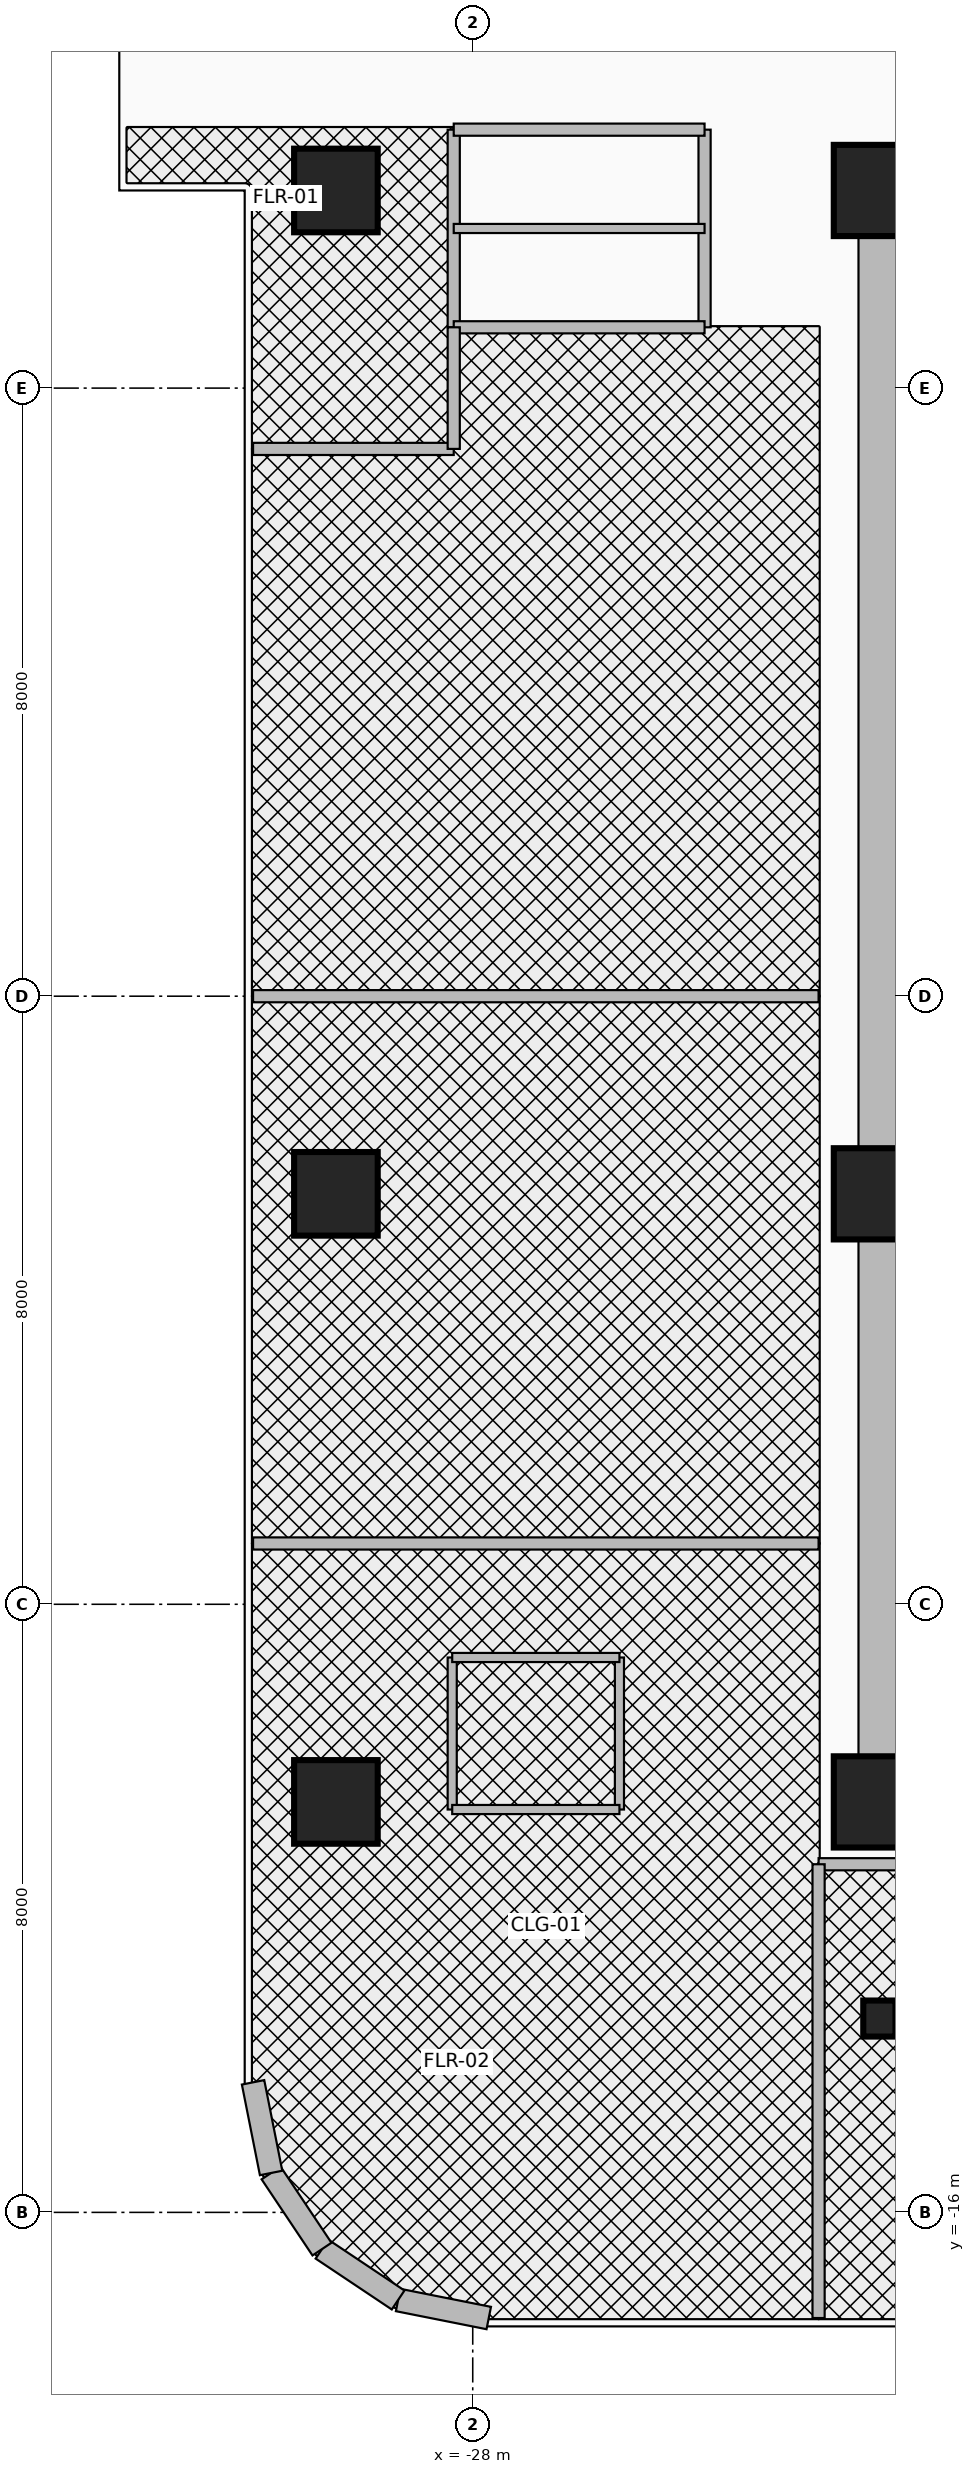
"""IFC4 building model, lengths in metres.
Left out: names, types, materials, properties, quantities, classifications, styles, units other than length and angle.
Written with IfcOpenShell. Run it as: python <this file> out.ifc"""

import sys

from ifc_helpers import new_model, si_unit, direction, frame, frame_2d, origin, origin_2d, place, context, subcontext, project, spatial, rectangle, circle, i_section, extrude, source, transform, mapped, element, fill, save


model = new_model("IFC4")
c1 = context("Model", 3, precision=1e-05, world=origin(), true_north=direction((0.0, 1.0)))
c2 = subcontext(c1, "Body", "Model", "MODEL_VIEW")
j1 = project(units=[si_unit("LENGTHUNIT", "METRE"), si_unit("PLANEANGLEUNIT", "RADIAN")], contexts=[c1])
p1 = place(None, origin())
s1 = spatial("IfcSite", under=j1, at=p1, CompositionType="ELEMENT")
p2 = place(p1, origin())
s2 = spatial("IfcBuilding", under=s1, at=p2, CompositionType="ELEMENT")
p3 = place(p2, frame((0.0, 0.0, 153.8)))
s3 = spatial("IfcBuildingStorey", under=s2, at=p3, CompositionType="ELEMENT", Elevation=153.8)
p4 = place(p3, frame((-22.65, -11.075, 0.0), z_axis=(0.0, 0.0, 1.0), x_axis=(0.0, 1.0, 0.0)))
e1 = element("IfcWall", 1, at=p4, inside=s3, PredefinedType="SHEAR", context=c2, shape_type="SweptSolid", body=[
    extrude(rectangle(XDim=22.15, YDim=0.55, at=frame_2d((11.075, 0.0))), origin(), (0.0, 0.0, 1.0), 3.46),
])
for number, where, z_axis, x_axis in (
    (2, (-22.65, 10.8, 0.0), (0.0, 0.0, 1.0), (1.0, 0.0, 0.0)),
    (3, (-22.65, -10.8, 0.0), (0.0, 0.0, 1.0), (1.0, 0.0, 0.0)),
):
    element("IfcWall", number, at=place(p3, frame(where, z_axis=z_axis, x_axis=x_axis)), inside=s3, PredefinedType="SHEAR", context=c2, shape_type="SweptSolid", body=[
        extrude(rectangle(XDim=10.25, YDim=0.55, at=frame_2d((5.125, 0.0))), origin(), (0.0, 0.0, 1.0), 3.46),
    ])
m1 = source(origin(), c2, "Body", "SweptSolid", [
    extrude(circle(Radius=0.55, at=origin_2d()), origin(), (0.0, 0.0, 1.0), 3.7),
])
p5 = place(p3, frame((-29.8, -10.6, 0.0), z_axis=(0.0, 0.0, 1.0), x_axis=(1.0, 0.0, 0.0)))
e4 = element("IfcColumn", 4, at=p5, inside=s3, PredefinedType="COLUMN", context=c2, shape_type="MappedRepresentation", body=[
    mapped(m1, transform((0.0, 0.0, 0.0), x_axis=(1.0, 0.0, 0.0), y_axis=(0.0, 1.0, 0.0), z_axis=(0.0, 0.0, 1.0), scale=1.0)),
])
m2 = source(origin(), c2, "Body", "SweptSolid", [
    extrude(rectangle(XDim=1.2, YDim=1.2, at=origin_2d()), origin(), (0.0, 0.0, 1.0), 3.7),
])
p6 = place(p3, frame((-22.65, -10.6, 0.0), z_axis=(0.0, 0.0, 1.0), x_axis=(1.0, 0.0, 0.0)))
e5 = element("IfcColumn", 5, at=p6, inside=s3, PredefinedType="COLUMN", context=c2, shape_type="MappedRepresentation", body=[
    mapped(m2, transform((0.0, 0.0, 0.0), x_axis=(1.0, 0.0, 0.0), y_axis=(0.0, 1.0, 0.0), z_axis=(0.0, 0.0, 1.0), scale=1.0)),
])
p7 = place(p3, frame((-29.8, -2.6, 0.0), z_axis=(0.0, 0.0, 1.0), x_axis=(1.0, 0.0, 0.0)))
e6 = element("IfcColumn", 6, at=p7, inside=s3, PredefinedType="COLUMN", context=c2, shape_type="MappedRepresentation", body=[
    mapped(m1, transform((0.0, 0.0, 0.0), x_axis=(1.0, 0.0, 0.0), y_axis=(0.0, 1.0, 0.0), z_axis=(0.0, 0.0, 1.0), scale=1.0)),
])
p8 = place(p3, frame((-22.65, -2.6, 0.0), z_axis=(0.0, 0.0, 1.0), x_axis=(1.0, 0.0, 0.0)))
e7 = element("IfcColumn", 7, at=p8, inside=s3, PredefinedType="COLUMN", context=c2, shape_type="MappedRepresentation", body=[
    mapped(m2, transform((0.0, 0.0, 0.0), x_axis=(1.0, 0.0, 0.0), y_axis=(0.0, 1.0, 0.0), z_axis=(0.0, 0.0, 1.0), scale=1.0)),
])
p9 = place(p3, frame((-29.8, 10.6, 0.0), z_axis=(0.0, 0.0, 1.0), x_axis=(1.0, 0.0, 0.0)))
e8 = element("IfcColumn", 8, at=p9, inside=s3, PredefinedType="COLUMN", context=c2, shape_type="MappedRepresentation", body=[
    mapped(m1, transform((0.0, 0.0, 0.0), x_axis=(1.0, 0.0, 0.0), y_axis=(0.0, 1.0, 0.0), z_axis=(0.0, 0.0, 1.0), scale=1.0)),
])
p10 = place(p3, frame((-22.65, 10.6, 0.0), z_axis=(0.0, 0.0, 1.0), x_axis=(1.0, 0.0, 0.0)))
e9 = element("IfcColumn", 9, at=p10, inside=s3, PredefinedType="COLUMN", context=c2, shape_type="MappedRepresentation", body=[
    mapped(m2, transform((0.0, 0.0, 0.0), x_axis=(1.0, 0.0, 0.0), y_axis=(0.0, 1.0, 0.0), z_axis=(0.0, 0.0, 1.0), scale=1.0)),
])
m3 = source(origin(), c2, "Body", "SweptSolid", [
    extrude(i_section(OverallWidth=0.424, OverallDepth=0.474, WebThickness=0.048, FlangeThickness=0.077, at=origin_2d()), origin(), (0.0, 0.0, 1.0), 3.7),
])
p11 = place(p3, frame((-22.65, -13.45, 0.0), z_axis=(0.0, 0.0, 1.0), x_axis=(1.0, 0.0, 0.0)))
e10 = element("IfcColumn", 10, at=p11, inside=s3, PredefinedType="COLUMN", context=c2, shape_type="MappedRepresentation", body=[
    mapped(m3, transform((0.0, 0.0, 0.0), x_axis=(1.0, 0.0, 0.0), y_axis=(0.0, 1.0, 0.0), z_axis=(0.0, 0.0, 1.0), scale=1.0)),
])
p12 = place(p3, frame((-27.789, -17.39, 0.0), z_axis=(0.0, 0.0, 1.0), x_axis=(-0.980804027463, 0.194996050505, 0.0)))
e11 = element("IfcWall", 11, at=p12, inside=s3, PredefinedType="SOLIDWALL", context=c2, shape_type="SweptSolid", body=[
    extrude(rectangle(XDim=1.216, YDim=0.3, at=frame_2d((0.608, 0.0))), origin(), (0.0, 0.0, 1.0), 3.46),
])
for number, where, z_axis, x_axis in (
    (12, (-28.982, -17.153, 0.0), (0.0, 0.0, 1.0), (-0.831, 0.556, 0.0)),
    (13, (-29.983, -16.483, 0.0), (0.0, 0.0, 1.0), (-0.556, 0.831, 0.0)),
):
    element("IfcWall", number, at=place(p3, frame(where, z_axis=z_axis, x_axis=x_axis)), inside=s3, PredefinedType="SOLIDWALL", context=c2, shape_type="SweptSolid", body=[
        extrude(rectangle(XDim=1.205, YDim=0.3, at=frame_2d((0.603, 0.0))), origin(), (0.0, 0.0, 1.0), 3.46),
    ])
p13 = place(p3, frame((-30.653, -15.482, 0.0), z_axis=(0.0, 0.0, 1.0), x_axis=(-0.194996050505, 0.980804027463, 0.0)))
e14 = element("IfcWall", 14, at=p13, inside=s3, PredefinedType="SOLIDWALL", context=c2, shape_type="SweptSolid", body=[
    extrude(rectangle(XDim=1.216, YDim=0.3, at=frame_2d((0.608, 0.0))), origin(), (0.0, 0.0, 1.0), 3.46),
])
p14 = place(p3, frame((-28.25, 8.8, 0.0), z_axis=(0.0, 0.0, 1.0), x_axis=(0.0, 1.0, 0.0)))
e15 = element("IfcWall", 15, at=p14, inside=s3, PredefinedType="PARTITIONING", context=c2, shape_type="SweptSolid", body=[
    extrude(rectangle(XDim=2.6, YDim=0.16, at=frame_2d((1.3, 0.0))), origin(), (0.0, 0.0, 1.0), 2.666),
])
p15 = place(p3, frame((-24.95, 8.8, 0.0), z_axis=(0.0, 0.0, 1.0), x_axis=(0.0, 1.0, 0.0)))
e16 = element("IfcWall", 16, at=p15, inside=s3, PredefinedType="PARTITIONING", context=c2, shape_type="SweptSolid", body=[
    extrude(rectangle(XDim=2.6, YDim=0.16, at=frame_2d((1.3, 0.0))), origin(), (0.0, 0.0, 1.0), 2.666),
])
p16 = place(p15, frame((0.3, 0.0, 0.0)))
e17 = element("IfcOpeningElement", 17, at=p16, cuts=e16, PredefinedType="OPENING", context=c2, shape_type="SweptSolid", body=[
    extrude(rectangle(XDim=0.85, YDim=2.1, at=frame_2d((0.425, 1.05))), frame((0.0, 0.095, 0.0), z_axis=(0.0, -1.0, 0.0), x_axis=(1.0, 0.0, 0.0)), (0.0, 0.0, 1.0), 0.19),
])
p17 = place(p15, frame((1.45, 0.0, 0.0)))
e18 = element("IfcOpeningElement", 18, at=p17, cuts=e16, PredefinedType="OPENING", context=c2, shape_type="SweptSolid", body=[
    extrude(rectangle(XDim=0.85, YDim=2.1, at=frame_2d((0.425, 1.05))), frame((0.0, 0.095, 0.0), z_axis=(0.0, -1.0, 0.0), x_axis=(1.0, 0.0, 0.0)), (0.0, 0.0, 1.0), 0.19),
])
for number, where, z_axis, x_axis in (
    (19, (-28.25, 8.8, 0.0), (0.0, 0.0, 1.0), (1.0, 0.0, 0.0)),
    (20, (-28.25, 11.4, 0.0), (0.0, 0.0, 1.0), (1.0, 0.0, 0.0)),
):
    element("IfcWall", number, at=place(p3, frame(where, z_axis=z_axis, x_axis=x_axis)), inside=s3, PredefinedType="PARTITIONING", context=c2, shape_type="SweptSolid", body=[
        extrude(rectangle(XDim=3.3, YDim=0.16, at=frame_2d((1.65, 0.0))), origin(), (0.0, 0.0, 1.0), 3.46),
    ])
p18 = place(p3, frame((-28.25, 10.1, 0.0), z_axis=(0.0, 0.0, 1.0), x_axis=(1.0, 0.0, 0.0)))
e21 = element("IfcWall", 21, at=p18, inside=s3, PredefinedType="PARTITIONING", context=c2, shape_type="SweptSolid", body=[
    extrude(rectangle(XDim=3.3, YDim=0.12, at=frame_2d((1.65, 0.0))), origin(), (0.0, 0.0, 1.0), 3.46),
])
p19 = place(p3, frame((-23.45, -11.42, 0.0), z_axis=(0.0, 0.0, 1.0), x_axis=(1.0, 0.0, 0.0)))
e22 = element("IfcWall", 22, at=p19, inside=s3, PredefinedType="PARTITIONING", context=c2, shape_type="SweptSolid", body=[
    extrude(rectangle(XDim=13.84, YDim=0.16, at=frame_2d((6.92, 0.0))), origin(), (0.0, 0.0, 1.0), 2.834),
])
p20 = place(p3, frame((-23.45, -17.39, 0.0), z_axis=(0.0, 0.0, 1.0), x_axis=(0.0, 1.0, 0.0)))
e23 = element("IfcWall", 23, at=p20, inside=s3, PredefinedType="PARTITIONING", context=c2, shape_type="SweptSolid", body=[
    extrude(rectangle(XDim=5.97, YDim=0.16, at=frame_2d((2.985, 0.0))), origin(), (0.0, 0.0, 1.0), 3.46),
])
p21 = place(p20, frame((2.535, 0.0, 0.0)))
e24 = element("IfcOpeningElement", 24, at=p21, cuts=e23, PredefinedType="OPENING", context=c2, shape_type="SweptSolid", body=[
    extrude(rectangle(XDim=0.9, YDim=2.1, at=frame_2d((0.45, 1.05))), frame((0.0, 0.095, 0.0), z_axis=(0.0, -1.0, 0.0), x_axis=(1.0, 0.0, 0.0)), (0.0, 0.0, 1.0), 0.19),
])
p22 = place(p3, frame((-30.89, -7.2, 0.0), z_axis=(0.0, 0.0, 1.0), x_axis=(1.0, 0.0, 0.0)))
e25 = element("IfcWall", 25, at=p22, inside=s3, PredefinedType="PARTITIONING", context=c2, shape_type="SweptSolid", body=[
    extrude(rectangle(XDim=7.44, YDim=0.16, at=frame_2d((3.72, 0.0))), origin(), (0.0, 0.0, 1.0), 2.896),
])
p23 = place(p22, frame((3.245, 0.0, 0.0)))
e26 = element("IfcOpeningElement", 26, at=p23, cuts=e25, PredefinedType="OPENING", context=c2, shape_type="SweptSolid", body=[
    extrude(rectangle(XDim=0.95, YDim=2.15, at=frame_2d((0.475, 1.075))), frame((0.0, 0.095, 0.0), z_axis=(0.0, -1.0, 0.0), x_axis=(1.0, 0.0, 0.0)), (0.0, 0.0, 1.0), 0.19),
])
p24 = place(p3, frame((-30.89, 7.2, 0.0), z_axis=(0.0, 0.0, 1.0), x_axis=(1.0, 0.0, 0.0)))
e27 = element("IfcWall", 27, at=p24, inside=s3, PredefinedType="PARTITIONING", context=c2, shape_type="SweptSolid", body=[
    extrude(rectangle(XDim=2.64, YDim=0.16, at=frame_2d((1.32, 0.0))), origin(), (0.0, 0.0, 1.0), 2.896),
])
p25 = place(p24, frame((0.87, 0.0, 0.0)))
e28 = element("IfcOpeningElement", 28, at=p25, cuts=e27, PredefinedType="OPENING", context=c2, shape_type="SweptSolid", body=[
    extrude(rectangle(XDim=0.9, YDim=2.1, at=frame_2d((0.45, 1.05))), frame((0.0, 0.095, 0.0), z_axis=(0.0, -1.0, 0.0), x_axis=(1.0, 0.0, 0.0)), (0.0, 0.0, 1.0), 0.19),
])
p26 = place(p3, frame((-28.25, 7.2, 0.0), z_axis=(0.0, 0.0, 1.0), x_axis=(0.0, 1.0, 0.0)))
e29 = element("IfcWall", 29, at=p26, inside=s3, PredefinedType="PARTITIONING", context=c2, shape_type="SweptSolid", body=[
    extrude(rectangle(XDim=1.6, YDim=0.16, at=frame_2d((0.8, 0.0))), origin(), (0.0, 0.0, 1.0), 2.988),
])
for number, where, z_axis, x_axis in (
    (30, (-28.27, -10.7, 0.0), (0.0, 0.0, 1.0), (0.0, 1.0, 0.0)),
    (31, (-26.07, -10.7, 0.0), (0.0, 0.0, 1.0), (0.0, 1.0, 0.0)),
):
    element("IfcWall", number, at=place(p3, frame(where, z_axis=z_axis, x_axis=x_axis)), inside=s3, PredefinedType="PARTITIONING", context=c2, shape_type="SweptSolid", body=[
        extrude(rectangle(XDim=2.0, YDim=0.12, at=frame_2d((1.0, 0.0))), origin(), (0.0, 0.0, 1.0), 2.666),
    ])
p27 = place(p3, frame((-28.27, -10.7, 0.0), z_axis=(0.0, 0.0, 1.0), x_axis=(1.0, 0.0, 0.0)))
e32 = element("IfcWall", 32, at=p27, inside=s3, PredefinedType="PARTITIONING", context=c2, shape_type="SweptSolid", body=[
    extrude(rectangle(XDim=2.2, YDim=0.12, at=frame_2d((1.1, 0.0))), origin(), (0.0, 0.0, 1.0), 2.666),
])
p28 = place(p3, frame((-28.27, -8.7, 0.0), z_axis=(0.0, 0.0, 1.0), x_axis=(1.0, 0.0, 0.0)))
e33 = element("IfcWall", 33, at=p28, inside=s3, PredefinedType="PARTITIONING", context=c2, shape_type="SweptSolid", body=[
    extrude(rectangle(XDim=2.2, YDim=0.12, at=frame_2d((1.1, 0.0))), origin(), (0.0, 0.0, 1.0), 3.46),
])
p29 = place(p28, frame((0.675, 0.0, 0.0)))
e34 = element("IfcOpeningElement", 34, at=p29, cuts=e33, PredefinedType="OPENING", context=c2, shape_type="SweptSolid", body=[
    extrude(rectangle(XDim=0.85, YDim=2.1, at=frame_2d((0.425, 1.05))), frame((0.0, 0.075, 0.0), z_axis=(0.0, -1.0, 0.0), x_axis=(1.0, 0.0, 0.0)), (0.0, 0.0, 1.0), 0.15),
])
p30 = place(p3, frame((-30.89, 0.0, 0.0), z_axis=(0.0, 0.0, 1.0), x_axis=(1.0, 0.0, 0.0)))
e35 = element("IfcWall", 35, at=p30, inside=s3, PredefinedType="PARTITIONING", context=c2, shape_type="SweptSolid", body=[
    extrude(rectangle(XDim=7.44, YDim=0.16, at=frame_2d((3.72, 0.0))), origin(), (0.0, 0.0, 1.0), 2.896),
])
p31 = place(p30, frame((3.2, 0.0, 0.0)))
e36 = element("IfcOpeningElement", 36, at=p31, cuts=e35, PredefinedType="OPENING", context=c2, shape_type="SweptSolid", body=[
    extrude(rectangle(XDim=1.8, YDim=2.15, at=frame_2d((0.9, 1.075))), frame((0.0, 0.095, 0.0), z_axis=(0.0, -1.0, 0.0), x_axis=(1.0, 0.0, 0.0)), (0.0, 0.0, 1.0), 0.19),
])
p32 = place(p16, origin())
e37 = element("IfcDoor", 37, at=p32, inside=s3, OperationType="SINGLE_SWING_RIGHT", PredefinedType="DOOR", context=c2, shape_type="SweptSolid", body=[
    extrude(rectangle(XDim=0.85, YDim=2.1, at=frame_2d((0.425, 1.05))), frame((0.0, 0.025, 0.0), z_axis=(0.0, -1.0, 0.0), x_axis=(1.0, 0.0, 0.0)), (0.0, 0.0, 1.0), 0.05),
])
fill(e17, e37)
p33 = place(p17, origin())
e38 = element("IfcDoor", 38, at=p33, inside=s3, OperationType="SINGLE_SWING_LEFT", PredefinedType="DOOR", context=c2, shape_type="SweptSolid", body=[
    extrude(rectangle(XDim=0.85, YDim=2.1, at=frame_2d((0.425, 1.05))), frame((0.0, 0.025, 0.0), z_axis=(0.0, -1.0, 0.0), x_axis=(1.0, 0.0, 0.0)), (0.0, 0.0, 1.0), 0.05),
])
fill(e18, e38)
p34 = place(p23, origin())
e39 = element("IfcDoor", 39, at=p34, inside=s3, OperationType="SINGLE_SWING_RIGHT", PredefinedType="DOOR", context=c2, shape_type="SweptSolid", body=[
    extrude(rectangle(XDim=0.95, YDim=2.15, at=frame_2d((0.475, 1.075))), frame((0.0, 0.025, 0.0), z_axis=(0.0, -1.0, 0.0), x_axis=(1.0, 0.0, 0.0)), (0.0, 0.0, 1.0), 0.05),
])
fill(e26, e39)
p35 = place(p29, origin())
e40 = element("IfcDoor", 40, at=p35, inside=s3, OperationType="SINGLE_SWING_LEFT", PredefinedType="DOOR", context=c2, shape_type="SweptSolid", body=[
    extrude(rectangle(XDim=0.85, YDim=2.1, at=frame_2d((0.425, 1.05))), frame((0.0, 0.025, 0.0), z_axis=(0.0, -1.0, 0.0), x_axis=(1.0, 0.0, 0.0)), (0.0, 0.0, 1.0), 0.05),
])
fill(e34, e40)
p36 = place(p25, origin())
e41 = element("IfcDoor", 41, at=p36, inside=s3, OperationType="SINGLE_SWING_RIGHT", PredefinedType="DOOR", context=c2, shape_type="SweptSolid", body=[
    extrude(rectangle(XDim=0.9, YDim=2.1, at=frame_2d((0.45, 1.05))), frame((0.0, 0.025, 0.0), z_axis=(0.0, -1.0, 0.0), x_axis=(1.0, 0.0, 0.0)), (0.0, 0.0, 1.0), 0.05),
])
fill(e28, e41)
p37 = place(p31, frame((1.8, 0.0, 0.0), z_axis=(0.0, 0.0, 1.0), x_axis=(-1.0, 0.0, 0.0)))
e42 = element("IfcDoor", 42, at=p37, inside=s3, OperationType="DOUBLE_DOOR_SINGLE_SWING", PredefinedType="DOOR", context=c2, shape_type="SweptSolid", body=[
    extrude(rectangle(XDim=1.8, YDim=2.15, at=frame_2d((0.9, 1.075))), frame((0.0, 0.025, 0.0), z_axis=(0.0, -1.0, 0.0), x_axis=(1.0, 0.0, 0.0)), (0.0, 0.0, 1.0), 0.05),
])
fill(e36, e42)
p38 = place(p21, origin())
e43 = element("IfcDoor", 43, at=p38, inside=s3, OperationType="SINGLE_SWING_RIGHT", PredefinedType="DOOR", context=c2, shape_type="SweptSolid", body=[
    extrude(rectangle(XDim=0.9, YDim=2.1, at=frame_2d((0.45, 1.05))), frame((0.0, 0.025, 0.0), z_axis=(0.0, -1.0, 0.0), x_axis=(1.0, 0.0, 0.0)), (0.0, 0.0, 1.0), 0.05),
])
fill(e24, e43)
save(model, sys.argv[1])
